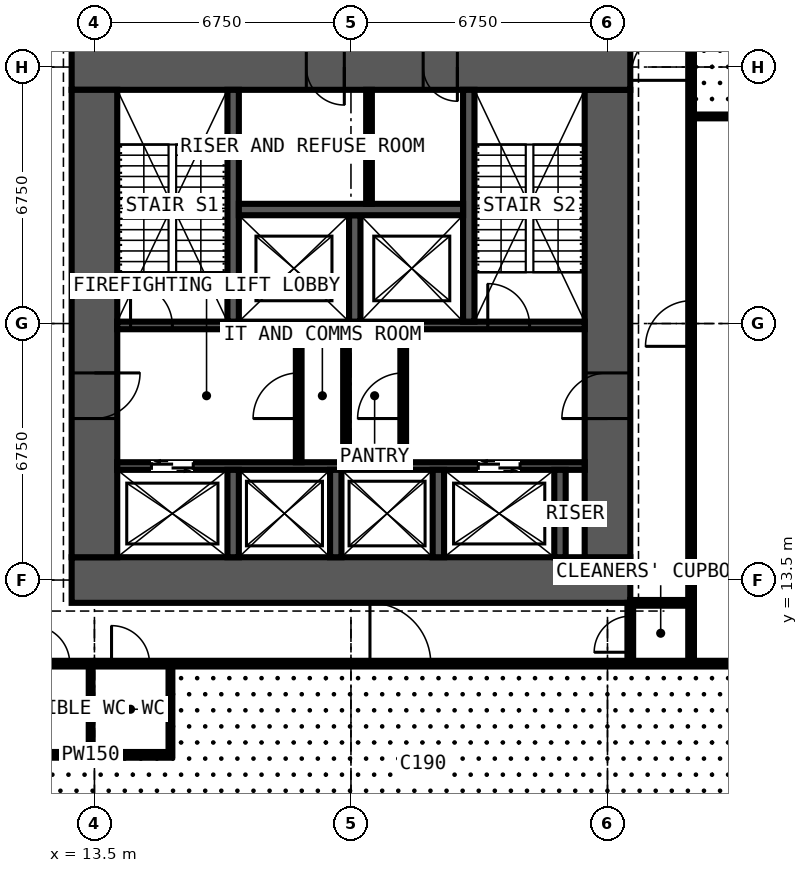
"""IFC4 building model, lengths in metres.
Left out: names, types, materials, properties, quantities, classifications, styles, units other than length and angle.
Written with IfcOpenShell. Run it as: python <this file> out.ifc"""

import sys

from ifc_helpers import new_model, si_unit, direction, frame, frame_2d, origin, place, context, subcontext, project, spatial, rectangle, extrude, element, fill, save


model = new_model("IFC4")
c1 = context("Model", 3, precision=1e-05, world=origin(), true_north=direction((0.0, 1.0)))
c2 = subcontext(c1, "Body", "Model", "MODEL_VIEW")
j1 = project(units=[si_unit("LENGTHUNIT", "METRE"), si_unit("PLANEANGLEUNIT", "RADIAN")], contexts=[c1])
p1 = place(None, origin())
s1 = spatial("IfcSite", under=j1, at=p1, CompositionType="ELEMENT")
p2 = place(p1, origin())
s2 = spatial("IfcBuilding", under=s1, at=p2, CompositionType="ELEMENT")
p3 = place(p2, frame((0.0, 0.0, 4.5)))
s3 = spatial("IfcBuildingStorey", under=s2, at=p3, CompositionType="ELEMENT", Elevation=4.5)
p4 = place(p3, frame((12.9, 13.5, 0.0), z_axis=(0.0, 0.0, 1.0), x_axis=(1.0, 0.0, 0.0)))
e1 = element("IfcWall", 1, at=p4, inside=s3, PredefinedType="SHEAR", context=c2, shape_type="SweptSolid", body=[
    extrude(rectangle(XDim=14.7, YDim=1.2, at=frame_2d((7.35, 0.0))), origin(), (0.0, 0.0, 1.0), 4.5),
])
p5 = place(p3, frame((27.0, 14.1, 0.0), z_axis=(0.0, 0.0, 1.0), x_axis=(0.0, 1.0, 0.0)))
e2 = element("IfcWall", 2, at=p5, inside=s3, PredefinedType="SHEAR", context=c2, shape_type="SweptSolid", body=[
    extrude(rectangle(XDim=12.3, YDim=1.2, at=frame_2d((6.15, 0.0))), origin(), (0.0, 0.0, 1.0), 4.5),
])
p6 = place(p5, frame((3.65, 0.0, 0.0)))
e3 = element("IfcOpeningElement", 3, at=p6, cuts=e2, PredefinedType="OPENING", context=c2, shape_type="SweptSolid", body=[
    extrude(rectangle(XDim=1.2, YDim=2.2, at=frame_2d((0.6, 1.1))), frame((0.0, 0.61, 0.0), z_axis=(0.0, -1.0, 0.0), x_axis=(1.0, 0.0, 0.0)), (0.0, 0.0, 1.0), 1.22),
])
p7 = place(p3, frame((27.6, 27.0, 0.0), z_axis=(0.0, 0.0, 1.0), x_axis=(-1.0, 0.0, 0.0)))
e4 = element("IfcWall", 4, at=p7, inside=s3, PredefinedType="SHEAR", context=c2, shape_type="SweptSolid", body=[
    extrude(rectangle(XDim=14.7, YDim=1.2, at=frame_2d((7.35, 0.0))), origin(), (0.0, 0.0, 1.0), 4.5),
])
p8 = place(p7, frame((4.55, 0.0, 0.0)))
e5 = element("IfcOpeningElement", 5, at=p8, cuts=e4, PredefinedType="OPENING", context=c2, shape_type="SweptSolid", body=[
    extrude(rectangle(XDim=0.9, YDim=2.2, at=frame_2d((0.45, 1.1))), frame((0.0, 0.61, 0.0), z_axis=(0.0, -1.0, 0.0), x_axis=(1.0, 0.0, 0.0)), (0.0, 0.0, 1.0), 1.22),
])
p9 = place(p7, frame((7.525, 0.0, 0.0)))
e6 = element("IfcOpeningElement", 6, at=p9, cuts=e4, PredefinedType="OPENING", context=c2, shape_type="SweptSolid", body=[
    extrude(rectangle(XDim=1.0, YDim=2.2, at=frame_2d((0.5, 1.1))), frame((0.0, 0.61, 0.0), z_axis=(0.0, -1.0, 0.0), x_axis=(1.0, 0.0, 0.0)), (0.0, 0.0, 1.0), 1.22),
])
p10 = place(p3, frame((13.5, 26.4, 0.0), z_axis=(0.0, 0.0, 1.0), x_axis=(0.0, -1.0, 0.0)))
e7 = element("IfcWall", 7, at=p10, inside=s3, PredefinedType="SHEAR", context=c2, shape_type="SweptSolid", body=[
    extrude(rectangle(XDim=12.3, YDim=1.2, at=frame_2d((6.15, 0.0))), origin(), (0.0, 0.0, 1.0), 4.5),
])
p11 = place(p10, frame((7.45, 0.0, 0.0)))
e8 = element("IfcOpeningElement", 8, at=p11, cuts=e7, PredefinedType="OPENING", context=c2, shape_type="SweptSolid", body=[
    extrude(rectangle(XDim=1.2, YDim=2.2, at=frame_2d((0.6, 1.1))), frame((0.0, 0.61, 0.0), z_axis=(0.0, -1.0, 0.0), x_axis=(1.0, 0.0, 0.0)), (0.0, 0.0, 1.0), 1.22),
])
p12 = place(p3, frame((14.1, 16.5, 0.0), z_axis=(0.0, 0.0, 1.0), x_axis=(1.0, 0.0, 0.0)))
e9 = element("IfcWall", 9, at=p12, inside=s3, PredefinedType="SHEAR", context=c2, shape_type="SweptSolid", body=[
    extrude(rectangle(XDim=12.3, YDim=0.2, at=frame_2d((6.15, 0.0))), origin(), (0.0, 0.0, 1.0), 4.5),
])
p13 = place(p12, frame((0.9, 0.0, 0.0)))
e10 = element("IfcOpeningElement", 10, at=p13, cuts=e9, PredefinedType="OPENING", context=c2, shape_type="SweptSolid", body=[
    extrude(rectangle(XDim=1.1, YDim=2.2, at=frame_2d((0.55, 1.1))), frame((0.0, 0.11, 0.0), z_axis=(0.0, -1.0, 0.0), x_axis=(1.0, 0.0, 0.0)), (0.0, 0.0, 1.0), 0.22),
])
p14 = place(p12, frame((9.5, 0.0, 0.0)))
e11 = element("IfcOpeningElement", 11, at=p14, cuts=e9, PredefinedType="OPENING", context=c2, shape_type="SweptSolid", body=[
    extrude(rectangle(XDim=1.1, YDim=2.2, at=frame_2d((0.55, 1.1))), frame((0.0, 0.11, 0.0), z_axis=(0.0, -1.0, 0.0), x_axis=(1.0, 0.0, 0.0)), (0.0, 0.0, 1.0), 0.22),
])
p15 = place(p3, frame((14.1, 20.2, 0.0), z_axis=(0.0, 0.0, 1.0), x_axis=(1.0, 0.0, 0.0)))
e12 = element("IfcWall", 12, at=p15, inside=s3, PredefinedType="SHEAR", context=c2, shape_type="SweptSolid", body=[
    extrude(rectangle(XDim=12.3, YDim=0.2, at=frame_2d((6.15, 0.0))), origin(), (0.0, 0.0, 1.0), 4.5),
])
p16 = place(p15, frame((0.35, 0.0, 0.0)))
e13 = element("IfcOpeningElement", 13, at=p16, cuts=e12, PredefinedType="OPENING", context=c2, shape_type="SweptSolid", body=[
    extrude(rectangle(XDim=1.1, YDim=2.2, at=frame_2d((0.55, 1.1))), frame((0.0, 0.11, 0.0), z_axis=(0.0, -1.0, 0.0), x_axis=(1.0, 0.0, 0.0)), (0.0, 0.0, 1.0), 0.22),
])
p17 = place(p15, frame((9.75, 0.0, 0.0)))
e14 = element("IfcOpeningElement", 14, at=p17, cuts=e12, PredefinedType="OPENING", context=c2, shape_type="SweptSolid", body=[
    extrude(rectangle(XDim=1.1, YDim=2.2, at=frame_2d((0.55, 1.1))), frame((0.0, 0.11, 0.0), z_axis=(0.0, -1.0, 0.0), x_axis=(1.0, 0.0, 0.0)), (0.0, 0.0, 1.0), 0.22),
])
for number, where, z_axis, x_axis in (
    (15, (17.15, 20.3, 0.0), (0.0, 0.0, 1.0), (0.0, 1.0, 0.0)),
    (16, (23.35, 20.3, 0.0), (0.0, 0.0, 1.0), (0.0, 1.0, 0.0)),
):
    element("IfcWall", number, at=place(p3, frame(where, z_axis=z_axis, x_axis=x_axis)), inside=s3, PredefinedType="SHEAR", context=c2, shape_type="SweptSolid", body=[
        extrude(rectangle(XDim=6.1, YDim=0.3, at=frame_2d((3.05, 0.0))), origin(), (0.0, 0.0, 1.0), 4.5),
    ])
p18 = place(p3, frame((20.35, 20.3, 0.0), z_axis=(0.0, 0.0, 1.0), x_axis=(0.0, 1.0, 0.0)))
e17 = element("IfcWall", 17, at=p18, inside=s3, PredefinedType="SHEAR", context=c2, shape_type="SweptSolid", body=[
    extrude(rectangle(XDim=2.8, YDim=0.3, at=frame_2d((1.4, 0.0))), origin(), (0.0, 0.0, 1.0), 4.5),
])
p19 = place(p3, frame((17.3, 23.25, 0.0), z_axis=(0.0, 0.0, 1.0), x_axis=(1.0, 0.0, 0.0)))
e18 = element("IfcWall", 18, at=p19, inside=s3, PredefinedType="SHEAR", context=c2, shape_type="SweptSolid", body=[
    extrude(rectangle(XDim=5.9, YDim=0.3, at=frame_2d((2.95, 0.0))), origin(), (0.0, 0.0, 1.0), 4.5),
])
for number, where, z_axis, x_axis in (
    (19, (17.15, 14.1, 0.0), (0.0, 0.0, 1.0), (0.0, 1.0, 0.0)),
    (20, (19.85, 14.1, 0.0), (0.0, 0.0, 1.0), (0.0, 1.0, 0.0)),
    (21, (22.55, 14.1, 0.0), (0.0, 0.0, 1.0), (0.0, 1.0, 0.0)),
    (22, (25.75, 14.1, 0.0), (0.0, 0.0, 1.0), (0.0, 1.0, 0.0)),
):
    element("IfcWall", number, at=place(p3, frame(where, z_axis=z_axis, x_axis=x_axis)), inside=s3, PredefinedType="SHEAR", context=c2, shape_type="SweptSolid", body=[
        extrude(rectangle(XDim=2.3, YDim=0.3, at=frame_2d((1.15, 0.0))), origin(), (0.0, 0.0, 1.0), 4.5),
    ])
p20 = place(p3, frame((18.875, 16.6, 0.0), z_axis=(0.0, 0.0, 1.0), x_axis=(0.0, 1.0, 0.0)))
e23 = element("IfcWall", 23, at=p20, inside=s3, PredefinedType="PARTITIONING", context=c2, shape_type="SweptSolid", body=[
    extrude(rectangle(XDim=3.5, YDim=0.15, at=frame_2d((1.75, 0.0))), origin(), (0.0, 0.0, 1.0), 4.25),
])
p21 = place(p20, frame((1.15, 0.0, 0.0)))
e24 = element("IfcOpeningElement", 24, at=p21, cuts=e23, PredefinedType="OPENING", context=c2, shape_type="SweptSolid", body=[
    extrude(rectangle(XDim=1.2, YDim=2.2, at=frame_2d((0.6, 1.1))), frame((0.0, 0.085, 0.0), z_axis=(0.0, -1.0, 0.0), x_axis=(1.0, 0.0, 0.0)), (0.0, 0.0, 1.0), 0.17),
])
p22 = place(p3, frame((21.625, 16.6, 0.0), z_axis=(0.0, 0.0, 1.0), x_axis=(0.0, 1.0, 0.0)))
e25 = element("IfcWall", 25, at=p22, inside=s3, PredefinedType="PARTITIONING", context=c2, shape_type="SweptSolid", body=[
    extrude(rectangle(XDim=3.5, YDim=0.15, at=frame_2d((1.75, 0.0))), origin(), (0.0, 0.0, 1.0), 4.25),
])
p23 = place(p22, frame((1.15, 0.0, 0.0)))
e26 = element("IfcOpeningElement", 26, at=p23, cuts=e25, PredefinedType="OPENING", context=c2, shape_type="SweptSolid", body=[
    extrude(rectangle(XDim=1.2, YDim=2.2, at=frame_2d((0.6, 1.1))), frame((0.0, 0.085, 0.0), z_axis=(0.0, -1.0, 0.0), x_axis=(1.0, 0.0, 0.0)), (0.0, 0.0, 1.0), 0.17),
])
p24 = place(p3, frame((20.12, 16.6, 0.0), z_axis=(0.0, 0.0, 1.0), x_axis=(0.0, 1.0, 0.0)))
e27 = element("IfcWall", 27, at=p24, inside=s3, PredefinedType="PARTITIONING", context=c2, shape_type="SweptSolid", body=[
    extrude(rectangle(XDim=3.5, YDim=0.15, at=frame_2d((1.75, 0.0))), origin(), (0.0, 0.0, 1.0), 4.25),
])
p25 = place(p3, frame((20.725, 23.4, 0.0), z_axis=(0.0, 0.0, 1.0), x_axis=(0.0, 1.0, 0.0)))
e28 = element("IfcWall", 28, at=p25, inside=s3, PredefinedType="PARTITIONING", context=c2, shape_type="SweptSolid", body=[
    extrude(rectangle(XDim=3.0, YDim=0.15, at=frame_2d((1.5, 0.0))), origin(), (0.0, 0.0, 1.0), 4.25),
])
p26 = place(p3, frame((10.125, 11.3, 0.0), z_axis=(0.0, 0.0, 1.0), x_axis=(1.0, 0.0, 0.0)))
e29 = element("IfcWall", 29, at=p26, inside=s3, PredefinedType="PARTITIONING", context=c2, shape_type="SweptSolid", body=[
    extrude(rectangle(XDim=20.675, YDim=0.15, at=frame_2d((10.337, 0.0))), origin(), (0.0, 0.0, 1.0), 4.25),
])
p27 = place(p26, frame((1.725, 0.0, 0.0)))
e30 = element("IfcOpeningElement", 30, at=p27, cuts=e29, PredefinedType="OPENING", context=c2, shape_type="SweptSolid", body=[
    extrude(rectangle(XDim=1.0, YDim=2.2, at=frame_2d((0.5, 1.1))), frame((0.0, 0.085, 0.0), z_axis=(0.0, -1.0, 0.0), x_axis=(1.0, 0.0, 0.0)), (0.0, 0.0, 1.0), 0.17),
])
p28 = place(p26, frame((3.825, 0.0, 0.0)))
e31 = element("IfcOpeningElement", 31, at=p28, cuts=e29, PredefinedType="OPENING", context=c2, shape_type="SweptSolid", body=[
    extrude(rectangle(XDim=1.0, YDim=2.2, at=frame_2d((0.5, 1.1))), frame((0.0, 0.085, 0.0), z_axis=(0.0, -1.0, 0.0), x_axis=(1.0, 0.0, 0.0)), (0.0, 0.0, 1.0), 0.17),
])
p29 = place(p26, frame((10.625, 0.0, 0.0)))
e32 = element("IfcOpeningElement", 32, at=p29, cuts=e29, PredefinedType="OPENING", context=c2, shape_type="SweptSolid", body=[
    extrude(rectangle(XDim=1.6, YDim=2.4, at=frame_2d((0.8, 1.2))), frame((0.0, 0.085, 0.0), z_axis=(0.0, -1.0, 0.0), x_axis=(1.0, 0.0, 0.0)), (0.0, 0.0, 1.0), 0.17),
])
p30 = place(p3, frame((11.3, 8.9, 0.0), z_axis=(0.0, 0.0, 1.0), x_axis=(1.0, 0.0, 0.0)))
e33 = element("IfcWall", 33, at=p30, inside=s3, PredefinedType="PARTITIONING", context=c2, shape_type="SweptSolid", body=[
    extrude(rectangle(XDim=4.2, YDim=0.15, at=frame_2d((2.1, 0.0))), origin(), (0.0, 0.0, 1.0), 4.25),
])
p31 = place(p3, frame((13.4, 8.9, 0.0), z_axis=(0.0, 0.0, 1.0), x_axis=(0.0, 1.0, 0.0)))
e34 = element("IfcWall", 34, at=p31, inside=s3, PredefinedType="PARTITIONING", context=c2, shape_type="SweptSolid", body=[
    extrude(rectangle(XDim=2.4, YDim=0.1, at=frame_2d((1.2, 0.0))), origin(), (0.0, 0.0, 1.0), 3.752),
])
p32 = place(p3, frame((15.5, 8.9, 0.0), z_axis=(0.0, 0.0, 1.0), x_axis=(0.0, 1.0, 0.0)))
e35 = element("IfcWall", 35, at=p32, inside=s3, PredefinedType="PARTITIONING", context=c2, shape_type="SweptSolid", body=[
    extrude(rectangle(XDim=2.4, YDim=0.1, at=frame_2d((1.2, 0.0))), origin(), (0.0, 0.0, 1.0), 4.25),
])
p33 = place(p3, frame((27.6, 11.3, 0.0), z_axis=(0.0, 0.0, 1.0), x_axis=(0.0, 1.0, 0.0)))
e36 = element("IfcWall", 36, at=p33, inside=s3, PredefinedType="PARTITIONING", context=c2, shape_type="SweptSolid", body=[
    extrude(rectangle(XDim=1.6, YDim=0.15, at=frame_2d((0.8, 0.0))), origin(), (0.0, 0.0, 1.0), 4.25),
])
p34 = place(p33, frame((0.3, 0.0, 0.0)))
e37 = element("IfcOpeningElement", 37, at=p34, cuts=e36, PredefinedType="OPENING", context=c2, shape_type="SweptSolid", body=[
    extrude(rectangle(XDim=0.95, YDim=2.2, at=frame_2d((0.475, 1.1))), frame((0.0, 0.085, 0.0), z_axis=(0.0, -1.0, 0.0), x_axis=(1.0, 0.0, 0.0)), (0.0, 0.0, 1.0), 0.17),
])
p35 = place(p3, frame((27.6, 12.9, 0.0), z_axis=(0.0, 0.0, 1.0), x_axis=(1.0, 0.0, 0.0)))
e38 = element("IfcWall", 38, at=p35, inside=s3, PredefinedType="PARTITIONING", context=c2, shape_type="SweptSolid", body=[
    extrude(rectangle(XDim=1.6, YDim=0.15, at=frame_2d((0.8, 0.0))), origin(), (0.0, 0.0, 1.0), 3.752),
])
p36 = place(p3, frame((29.2, 11.3, 0.0), z_axis=(0.0, 0.0, 1.0), x_axis=(0.0, 1.0, 0.0)))
e39 = element("IfcWall", 39, at=p36, inside=s3, PredefinedType="PARTITIONING", context=c2, shape_type="SweptSolid", body=[
    extrude(rectangle(XDim=20.3, YDim=0.15, at=frame_2d((10.15, 0.0))), origin(), (0.0, 0.0, 1.0), 4.25),
])
p37 = place(p36, frame((15.35, 0.0, 0.0)))
e40 = element("IfcOpeningElement", 40, at=p37, cuts=e39, PredefinedType="OPENING", context=c2, shape_type="SweptSolid", body=[
    extrude(rectangle(XDim=1.6, YDim=2.4, at=frame_2d((0.8, 1.2))), frame((0.0, 0.085, 0.0), z_axis=(0.0, -1.0, 0.0), x_axis=(1.0, 0.0, 0.0)), (0.0, 0.0, 1.0), 0.17),
])
p38 = place(p36, frame((8.35, 0.0, 0.0)))
e41 = element("IfcOpeningElement", 41, at=p38, cuts=e39, PredefinedType="OPENING", context=c2, shape_type="SweptSolid", body=[
    extrude(rectangle(XDim=1.2, YDim=2.2, at=frame_2d((0.6, 1.1))), frame((0.0, 0.085, 0.0), z_axis=(0.0, -1.0, 0.0), x_axis=(1.0, 0.0, 0.0)), (0.0, 0.0, 1.0), 0.17),
])
p39 = place(p3, frame((29.2, 25.7, 0.0), z_axis=(0.0, 0.0, 1.0), x_axis=(1.0, 0.0, 0.0)))
e42 = element("IfcWall", 42, at=p39, inside=s3, PredefinedType="SHEAR", context=c2, shape_type="SweptSolid", body=[
    extrude(rectangle(XDim=3.45, YDim=0.1, at=frame_2d((1.725, 0.0))), origin(), (0.0, 0.0, 1.0), 4.25),
])
p40 = place(p13, origin())
e43 = element("IfcDoor", 43, at=p40, inside=s3, OperationType="DOUBLE_DOOR_SLIDING", PredefinedType="DOOR", context=c2, shape_type="SweptSolid", body=[
    extrude(rectangle(XDim=1.1, YDim=2.2, at=frame_2d((0.55, 1.1))), frame((0.0, 0.025, 0.0), z_axis=(0.0, -1.0, 0.0), x_axis=(1.0, 0.0, 0.0)), (0.0, 0.0, 1.0), 0.05),
])
fill(e10, e43)
p41 = place(p14, origin())
e44 = element("IfcDoor", 44, at=p41, inside=s3, OperationType="DOUBLE_DOOR_SLIDING", PredefinedType="DOOR", context=c2, shape_type="SweptSolid", body=[
    extrude(rectangle(XDim=1.1, YDim=2.2, at=frame_2d((0.55, 1.1))), frame((0.0, 0.025, 0.0), z_axis=(0.0, -1.0, 0.0), x_axis=(1.0, 0.0, 0.0)), (0.0, 0.0, 1.0), 0.05),
])
fill(e11, e44)
p42 = place(p11, origin())
e45 = element("IfcDoor", 45, at=p42, inside=s3, OperationType="DOUBLE_DOOR_SINGLE_SWING", PredefinedType="DOOR", context=c2, shape_type="SweptSolid", body=[
    extrude(rectangle(XDim=1.2, YDim=2.2, at=frame_2d((0.6, 1.1))), frame((0.0, 0.025, 0.0), z_axis=(0.0, -1.0, 0.0), x_axis=(1.0, 0.0, 0.0)), (0.0, 0.0, 1.0), 0.05),
])
fill(e8, e45)
p43 = place(p6, origin())
e46 = element("IfcDoor", 46, at=p43, inside=s3, OperationType="DOUBLE_DOOR_SINGLE_SWING", PredefinedType="DOOR", context=c2, shape_type="SweptSolid", body=[
    extrude(rectangle(XDim=1.2, YDim=2.2, at=frame_2d((0.6, 1.1))), frame((0.0, 0.025, 0.0), z_axis=(0.0, -1.0, 0.0), x_axis=(1.0, 0.0, 0.0)), (0.0, 0.0, 1.0), 0.05),
])
fill(e3, e46)
p44 = place(p21, origin())
e47 = element("IfcDoor", 47, at=p44, inside=s3, OperationType="DOUBLE_DOOR_SINGLE_SWING", PredefinedType="DOOR", context=c2, shape_type="SweptSolid", body=[
    extrude(rectangle(XDim=1.2, YDim=2.2, at=frame_2d((0.6, 1.1))), frame((0.0, 0.025, 0.0), z_axis=(0.0, -1.0, 0.0), x_axis=(1.0, 0.0, 0.0)), (0.0, 0.0, 1.0), 0.05),
])
fill(e24, e47)
p45 = place(p23, origin())
e48 = element("IfcDoor", 48, at=p45, inside=s3, OperationType="DOUBLE_DOOR_SINGLE_SWING", PredefinedType="DOOR", context=c2, shape_type="SweptSolid", body=[
    extrude(rectangle(XDim=1.2, YDim=2.2, at=frame_2d((0.6, 1.1))), frame((0.0, 0.025, 0.0), z_axis=(0.0, -1.0, 0.0), x_axis=(1.0, 0.0, 0.0)), (0.0, 0.0, 1.0), 0.05),
])
fill(e26, e48)
p46 = place(p8, origin())
e49 = element("IfcDoor", 49, at=p46, inside=s3, OperationType="SINGLE_SWING_LEFT", PredefinedType="DOOR", context=c2, shape_type="SweptSolid", body=[
    extrude(rectangle(XDim=0.9, YDim=2.2, at=frame_2d((0.45, 1.1))), frame((0.0, 0.4, 0.0), z_axis=(0.0, -1.0, 0.0), x_axis=(1.0, 0.0, 0.0)), (0.0, 0.0, 1.0), 0.8),
])
fill(e5, e49)
p47 = place(p9, origin())
e50 = element("IfcDoor", 50, at=p47, inside=s3, OperationType="SINGLE_SWING_LEFT", PredefinedType="DOOR", context=c2, shape_type="SweptSolid", body=[
    extrude(rectangle(XDim=1.0, YDim=2.2, at=frame_2d((0.5, 1.1))), frame((0.0, 0.025, 0.0), z_axis=(0.0, -1.0, 0.0), x_axis=(1.0, 0.0, 0.0)), (0.0, 0.0, 1.0), 0.05),
])
fill(e6, e50)
p48 = place(p16, origin())
e51 = element("IfcDoor", 51, at=p48, inside=s3, OperationType="SINGLE_SWING_LEFT", PredefinedType="DOOR", context=c2, shape_type="SweptSolid", body=[
    extrude(rectangle(XDim=1.1, YDim=2.2, at=frame_2d((0.55, 1.1))), frame((0.0, 0.025, 0.0), z_axis=(0.0, -1.0, 0.0), x_axis=(1.0, 0.0, 0.0)), (0.0, 0.0, 1.0), 0.05),
])
fill(e13, e51)
p49 = place(p17, origin())
e52 = element("IfcDoor", 52, at=p49, inside=s3, OperationType="SINGLE_SWING_LEFT", PredefinedType="DOOR", context=c2, shape_type="SweptSolid", body=[
    extrude(rectangle(XDim=1.1, YDim=2.2, at=frame_2d((0.55, 1.1))), frame((0.0, 0.025, 0.0), z_axis=(0.0, -1.0, 0.0), x_axis=(1.0, 0.0, 0.0)), (0.0, 0.0, 1.0), 0.05),
])
fill(e14, e52)
p50 = place(p34, origin())
e53 = element("IfcDoor", 53, at=p50, inside=s3, OperationType="SINGLE_SWING_LEFT", PredefinedType="DOOR", context=c2, shape_type="SweptSolid", body=[
    extrude(rectangle(XDim=0.95, YDim=2.2, at=frame_2d((0.475, 1.1))), frame((0.0, 0.025, 0.0), z_axis=(0.0, -1.0, 0.0), x_axis=(1.0, 0.0, 0.0)), (0.0, 0.0, 1.0), 0.05),
])
fill(e37, e53)
p51 = place(p27, origin())
e54 = element("IfcDoor", 54, at=p51, inside=s3, OperationType="SINGLE_SWING_LEFT", PredefinedType="DOOR", context=c2, shape_type="SweptSolid", body=[
    extrude(rectangle(XDim=1.0, YDim=2.2, at=frame_2d((0.5, 1.1))), frame((0.0, 0.025, 0.0), z_axis=(0.0, -1.0, 0.0), x_axis=(1.0, 0.0, 0.0)), (0.0, 0.0, 1.0), 0.05),
])
fill(e30, e54)
p52 = place(p28, origin())
e55 = element("IfcDoor", 55, at=p52, inside=s3, OperationType="SINGLE_SWING_LEFT", PredefinedType="DOOR", context=c2, shape_type="SweptSolid", body=[
    extrude(rectangle(XDim=1.0, YDim=2.2, at=frame_2d((0.5, 1.1))), frame((0.0, 0.025, 0.0), z_axis=(0.0, -1.0, 0.0), x_axis=(1.0, 0.0, 0.0)), (0.0, 0.0, 1.0), 0.05),
])
fill(e31, e55)
p53 = place(p29, origin())
e56 = element("IfcDoor", 56, at=p53, inside=s3, OperationType="DOUBLE_DOOR_SINGLE_SWING", PredefinedType="DOOR", context=c2, shape_type="SweptSolid", body=[
    extrude(rectangle(XDim=1.6, YDim=2.4, at=frame_2d((0.8, 1.2))), frame((0.0, 0.025, 0.0), z_axis=(0.0, -1.0, 0.0), x_axis=(1.0, 0.0, 0.0)), (0.0, 0.0, 1.0), 0.05),
])
fill(e32, e56)
p54 = place(p37, origin())
e57 = element("IfcDoor", 57, at=p54, inside=s3, OperationType="DOUBLE_DOOR_SINGLE_SWING", PredefinedType="DOOR", context=c2, shape_type="SweptSolid", body=[
    extrude(rectangle(XDim=1.6, YDim=2.4, at=frame_2d((0.8, 1.2))), frame((0.0, 0.025, 0.0), z_axis=(0.0, -1.0, 0.0), x_axis=(1.0, 0.0, 0.0)), (0.0, 0.0, 1.0), 0.05),
])
fill(e40, e57)
p55 = place(p38, origin())
e58 = element("IfcDoor", 58, at=p55, inside=s3, OperationType="DOUBLE_DOOR_SINGLE_SWING", PredefinedType="DOOR", context=c2, shape_type="SweptSolid", body=[
    extrude(rectangle(XDim=1.2, YDim=2.2, at=frame_2d((0.6, 1.1))), frame((0.0, 0.025, 0.0), z_axis=(0.0, -1.0, 0.0), x_axis=(1.0, 0.0, 0.0)), (0.0, 0.0, 1.0), 0.05),
])
fill(e41, e58)
save(model, sys.argv[1])
